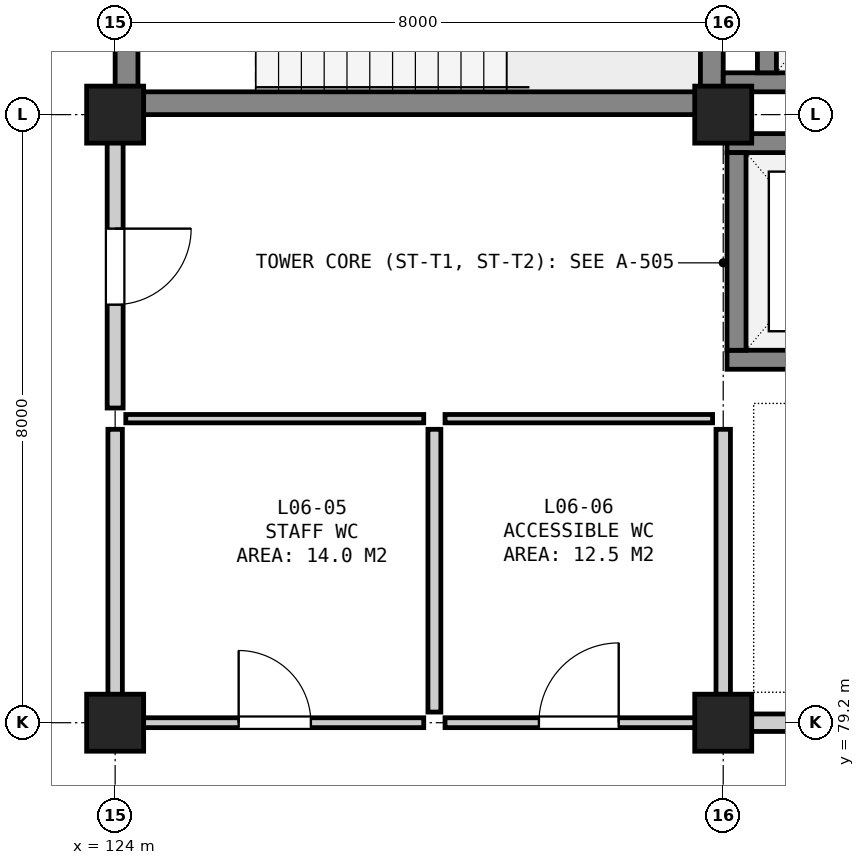
"""IFC4 building model, lengths in metres.
Left out: names, types, materials, properties, quantities, classifications, styles, units other than length and angle.
Written with IfcOpenShell. Run it as: python <this file> out.ifc"""

import sys

from ifc_helpers import new_model, si_unit, direction, frame, frame_2d, origin, origin_2d, place, context, subcontext, project, spatial, rectangle, extrude, element, fill, save


model = new_model("IFC4")
c1 = context("Model", 3, precision=1e-05, world=origin(), true_north=direction((0.0, 1.0)))
c2 = subcontext(c1, "Body", "Model", "MODEL_VIEW")
j1 = project(units=[si_unit("LENGTHUNIT", "METRE"), si_unit("PLANEANGLEUNIT", "RADIAN")], contexts=[c1])
p1 = place(None, origin())
s1 = spatial("IfcSite", under=j1, at=p1, CompositionType="ELEMENT")
p2 = place(p1, origin())
s2 = spatial("IfcBuilding", under=s1, at=p2, CompositionType="ELEMENT")
p3 = place(p2, frame((0.0, 0.0, 27.8)))
s3 = spatial("IfcBuildingStorey", under=s2, at=p3, CompositionType="ELEMENT", Elevation=27.8)
for number, where, z_axis, x_axis in (
    (1, (124.0, 79.2, 0.0), (0.0, 0.0, 1.0), (1.0, 0.0, 0.0)),
    (2, (124.0, 87.2, 0.0), (0.0, 0.0, 1.0), (1.0, 0.0, 0.0)),
    (3, (132.0, 79.2, 0.0), (0.0, 0.0, 1.0), (1.0, 0.0, 0.0)),
    (4, (132.0, 87.2, 0.0), (0.0, 0.0, 1.0), (1.0, 0.0, 0.0)),
):
    element("IfcColumn", number, at=place(p3, frame(where, z_axis=z_axis, x_axis=x_axis)), inside=s3, PredefinedType="COLUMN", context=c2, shape_type="SweptSolid", body=[
        extrude(rectangle(XDim=0.75, YDim=0.75, at=origin_2d()), origin(), (0.0, 0.0, 1.0), 3.9),
    ])
for number, where, z_axis, x_axis in (
    (5, (124.15, 87.2, 0.0), (0.0, 0.0, 1.0), (0.0, 1.0, 0.0)),
    (6, (131.85, 87.2, 0.0), (0.0, 0.0, 1.0), (0.0, 1.0, 0.0)),
):
    element("IfcWall", number, at=place(p3, frame(where, z_axis=z_axis, x_axis=x_axis)), inside=s3, PredefinedType="SHEAR", context=c2, shape_type="SweptSolid", body=[
        extrude(rectangle(XDim=4.2, YDim=0.3, at=frame_2d((2.1, 0.0))), origin(), (0.0, 0.0, 1.0), 3.62),
    ])
p4 = place(p3, frame((124.3, 87.35, 0.0), z_axis=(0.0, 0.0, 1.0), x_axis=(1.0, 0.0, 0.0)))
e7 = element("IfcWall", 7, at=p4, inside=s3, PredefinedType="SHEAR", context=c2, shape_type="SweptSolid", body=[
    extrude(rectangle(XDim=7.4, YDim=0.3, at=frame_2d((3.7, 0.0))), origin(), (0.0, 0.0, 1.0), 3.62),
])
p5 = place(p3, frame((132.0, 87.625, 0.0), z_axis=(0.0, 0.0, 1.0), x_axis=(1.0, 0.0, 0.0)))
e8 = element("IfcWall", 8, at=p5, inside=s3, PredefinedType="SHEAR", context=c2, shape_type="SweptSolid", body=[
    extrude(rectangle(XDim=3.15, YDim=0.25, at=frame_2d((1.575, 0.0))), origin(), (0.0, 0.0, 1.0), 3.62),
])
p6 = place(p3, frame((132.575, 87.75, 0.0), z_axis=(0.0, 0.0, 1.0), x_axis=(0.0, 1.0, 0.0)))
e9 = element("IfcWall", 9, at=p6, inside=s3, PredefinedType="SHEAR", context=c2, shape_type="SweptSolid", body=[
    extrude(rectangle(XDim=2.9, YDim=0.25, at=frame_2d((1.45, 0.0))), origin(), (0.0, 0.0, 1.0), 3.62),
])
p7 = place(p3, frame((132.05, 83.975, 0.0), z_axis=(0.0, 0.0, 1.0), x_axis=(1.0, 0.0, 0.0)))
e10 = element("IfcWall", 10, at=p7, inside=s3, PredefinedType="SHEAR", context=c2, shape_type="SweptSolid", body=[
    extrude(rectangle(XDim=2.7, YDim=0.25, at=frame_2d((1.35, 0.0))), origin(), (0.0, 0.0, 1.0), 3.62),
])
p8 = place(p7, frame((0.8, 0.0, 0.0)))
e11 = element("IfcOpeningElement", 11, at=p8, cuts=e10, PredefinedType="OPENING", context=c2, shape_type="SweptSolid", body=[
    extrude(rectangle(XDim=1.1, YDim=2.15, at=frame_2d((0.55, 1.075))), frame((0.0, 0.137, 0.0), z_axis=(0.0, -1.0, 0.0), x_axis=(1.0, 0.0, 0.0)), (0.0, 0.0, 1.0), 0.274),
])
p9 = place(p3, frame((132.05, 86.825, 0.0), z_axis=(0.0, 0.0, 1.0), x_axis=(1.0, 0.0, 0.0)))
e12 = element("IfcWall", 12, at=p9, inside=s3, PredefinedType="SHEAR", context=c2, shape_type="SweptSolid", body=[
    extrude(rectangle(XDim=2.7, YDim=0.25, at=frame_2d((1.35, 0.0))), origin(), (0.0, 0.0, 1.0), 3.62),
])
p10 = place(p3, frame((132.175, 84.1, 0.0), z_axis=(0.0, 0.0, 1.0), x_axis=(0.0, 1.0, 0.0)))
e13 = element("IfcWall", 13, at=p10, inside=s3, PredefinedType="SHEAR", context=c2, shape_type="SweptSolid", body=[
    extrude(rectangle(XDim=2.6, YDim=0.25, at=frame_2d((1.3, 0.0))), origin(), (0.0, 0.0, 1.0), 3.62),
])
p11 = place(p3, frame((124.14, 79.2, 0.0), z_axis=(0.0, 0.0, 1.0), x_axis=(1.0, 0.0, 0.0)))
e14 = element("IfcWall", 14, at=p11, inside=s3, PredefinedType="PARTITIONING", context=c2, shape_type="SweptSolid", body=[
    extrude(rectangle(XDim=3.92, YDim=0.13, at=frame_2d((1.96, 0.0))), origin(), (0.0, 0.0, 1.0), 3.035),
])
p12 = place(p11, frame((1.485, 0.0, 0.0)))
e15 = element("IfcOpeningElement", 15, at=p12, cuts=e14, PredefinedType="OPENING", context=c2, shape_type="SweptSolid", body=[
    extrude(rectangle(XDim=0.95, YDim=2.15, at=frame_2d((0.475, 1.075))), frame((0.0, 0.077, 0.0), z_axis=(0.0, -1.0, 0.0), x_axis=(1.0, 0.0, 0.0)), (0.0, 0.0, 1.0), 0.154),
])
p13 = place(p3, frame((124.14, 83.2, 0.0), z_axis=(0.0, 0.0, 1.0), x_axis=(1.0, 0.0, 0.0)))
e16 = element("IfcWall", 16, at=p13, inside=s3, PredefinedType="PARTITIONING", context=c2, shape_type="SweptSolid", body=[
    extrude(rectangle(XDim=3.92, YDim=0.11, at=frame_2d((1.96, 0.0))), origin(), (0.0, 0.0, 1.0), 3.62),
])
p14 = place(p3, frame((124.0, 79.34, 0.0), z_axis=(0.0, 0.0, 1.0), x_axis=(0.0, 1.0, 0.0)))
e17 = element("IfcWall", 17, at=p14, inside=s3, PredefinedType="PARTITIONING", context=c2, shape_type="SweptSolid", body=[
    extrude(rectangle(XDim=3.72, YDim=0.19, at=frame_2d((1.86, 0.0))), origin(), (0.0, 0.0, 1.0), 3.135),
])
p15 = place(p3, frame((128.2, 79.34, 0.0), z_axis=(0.0, 0.0, 1.0), x_axis=(0.0, 1.0, 0.0)))
e18 = element("IfcWall", 18, at=p15, inside=s3, PredefinedType="PARTITIONING", context=c2, shape_type="SweptSolid", body=[
    extrude(rectangle(XDim=3.72, YDim=0.17, at=frame_2d((1.86, 0.0))), origin(), (0.0, 0.0, 1.0), 3.62),
])
p16 = place(p3, frame((128.34, 79.2, 0.0), z_axis=(0.0, 0.0, 1.0), x_axis=(1.0, 0.0, 0.0)))
e19 = element("IfcWall", 19, at=p16, inside=s3, PredefinedType="PARTITIONING", context=c2, shape_type="SweptSolid", body=[
    extrude(rectangle(XDim=3.52, YDim=0.13, at=frame_2d((1.76, 0.0))), origin(), (0.0, 0.0, 1.0), 3.035),
])
p17 = place(p16, frame((1.235, 0.0, 0.0)))
e20 = element("IfcOpeningElement", 20, at=p17, cuts=e19, PredefinedType="OPENING", context=c2, shape_type="SweptSolid", body=[
    extrude(rectangle(XDim=1.05, YDim=2.15, at=frame_2d((0.525, 1.075))), frame((0.0, 0.077, 0.0), z_axis=(0.0, -1.0, 0.0), x_axis=(1.0, 0.0, 0.0)), (0.0, 0.0, 1.0), 0.154),
])
p18 = place(p3, frame((128.34, 83.2, 0.0), z_axis=(0.0, 0.0, 1.0), x_axis=(1.0, 0.0, 0.0)))
e21 = element("IfcWall", 21, at=p18, inside=s3, PredefinedType="PARTITIONING", context=c2, shape_type="SweptSolid", body=[
    extrude(rectangle(XDim=3.52, YDim=0.11, at=frame_2d((1.76, 0.0))), origin(), (0.0, 0.0, 1.0), 3.62),
])
p19 = place(p3, frame((132.0, 79.34, 0.0), z_axis=(0.0, 0.0, 1.0), x_axis=(0.0, 1.0, 0.0)))
e22 = element("IfcWall", 22, at=p19, inside=s3, PredefinedType="PARTITIONING", context=c2, shape_type="SweptSolid", body=[
    extrude(rectangle(XDim=3.72, YDim=0.19, at=frame_2d((1.86, 0.0))), origin(), (0.0, 0.0, 1.0), 2.935),
])
p20 = place(p3, frame((124.0, 83.34, 0.0), z_axis=(0.0, 0.0, 1.0), x_axis=(0.0, 1.0, 0.0)))
e23 = element("IfcWall", 23, at=p20, inside=s3, PredefinedType="SOLIDWALL", context=c2, shape_type="SweptSolid", body=[
    extrude(rectangle(XDim=3.72, YDim=0.21, at=frame_2d((1.86, 0.0))), origin(), (0.0, 0.0, 1.0), 3.135),
])
p21 = place(p20, frame((1.36, 0.0, 0.0)))
e24 = element("IfcOpeningElement", 24, at=p21, cuts=e23, PredefinedType="OPENING", context=c2, shape_type="SweptSolid", body=[
    extrude(rectangle(XDim=1.0, YDim=2.15, at=frame_2d((0.5, 1.075))), frame((0.0, 0.117, 0.0), z_axis=(0.0, -1.0, 0.0), x_axis=(1.0, 0.0, 0.0)), (0.0, 0.0, 1.0), 0.234),
])
p22 = place(p3, frame((132.14, 79.2, 0.0), z_axis=(0.0, 0.0, 1.0), x_axis=(1.0, 0.0, 0.0)))
e25 = element("IfcWall", 25, at=p22, inside=s3, PredefinedType="SOLIDWALL", context=c2, shape_type="SweptSolid", body=[
    extrude(rectangle(XDim=7.72, YDim=0.23, at=frame_2d((3.86, 0.0))), origin(), (0.0, 0.0, 1.0), 3.085),
])
p23 = place(p22, frame((3.11, 0.0, 0.0)))
e26 = element("IfcOpeningElement", 26, at=p23, cuts=e25, PredefinedType="OPENING", context=c2, shape_type="SweptSolid", body=[
    extrude(rectangle(XDim=1.5, YDim=2.2, at=frame_2d((0.75, 1.1))), frame((0.0, 0.127, 0.0), z_axis=(0.0, -1.0, 0.0), x_axis=(1.0, 0.0, 0.0)), (0.0, 0.0, 1.0), 0.254),
])
p24 = place(p12, origin())
e27 = element("IfcDoor", 27, at=p24, inside=s3, OperationType="SINGLE_SWING_LEFT", PredefinedType="DOOR", context=c2, shape_type="SweptSolid", body=[
    extrude(rectangle(XDim=0.95, YDim=2.15, at=frame_2d((0.475, 1.075))), frame((0.0, 0.025, 0.0), z_axis=(0.0, -1.0, 0.0), x_axis=(1.0, 0.0, 0.0)), (0.0, 0.0, 1.0), 0.05),
])
fill(e15, e27)
p25 = place(p17, origin())
e28 = element("IfcDoor", 28, at=p25, inside=s3, OperationType="SINGLE_SWING_RIGHT", PredefinedType="DOOR", context=c2, shape_type="SweptSolid", body=[
    extrude(rectangle(XDim=1.05, YDim=2.15, at=frame_2d((0.525, 1.075))), frame((0.0, 0.025, 0.0), z_axis=(0.0, -1.0, 0.0), x_axis=(1.0, 0.0, 0.0)), (0.0, 0.0, 1.0), 0.05),
])
fill(e20, e28)
p26 = place(p21, frame((1.0, 0.0, 0.0), z_axis=(0.0, 0.0, 1.0), x_axis=(-1.0, 0.0, 0.0)))
e29 = element("IfcDoor", 29, at=p26, inside=s3, OperationType="SINGLE_SWING_LEFT", PredefinedType="DOOR", context=c2, shape_type="SweptSolid", body=[
    extrude(rectangle(XDim=1.0, YDim=2.15, at=frame_2d((0.5, 1.075))), frame((0.0, 0.025, 0.0), z_axis=(0.0, -1.0, 0.0), x_axis=(1.0, 0.0, 0.0)), (0.0, 0.0, 1.0), 0.05),
])
fill(e24, e29)
save(model, sys.argv[1])
